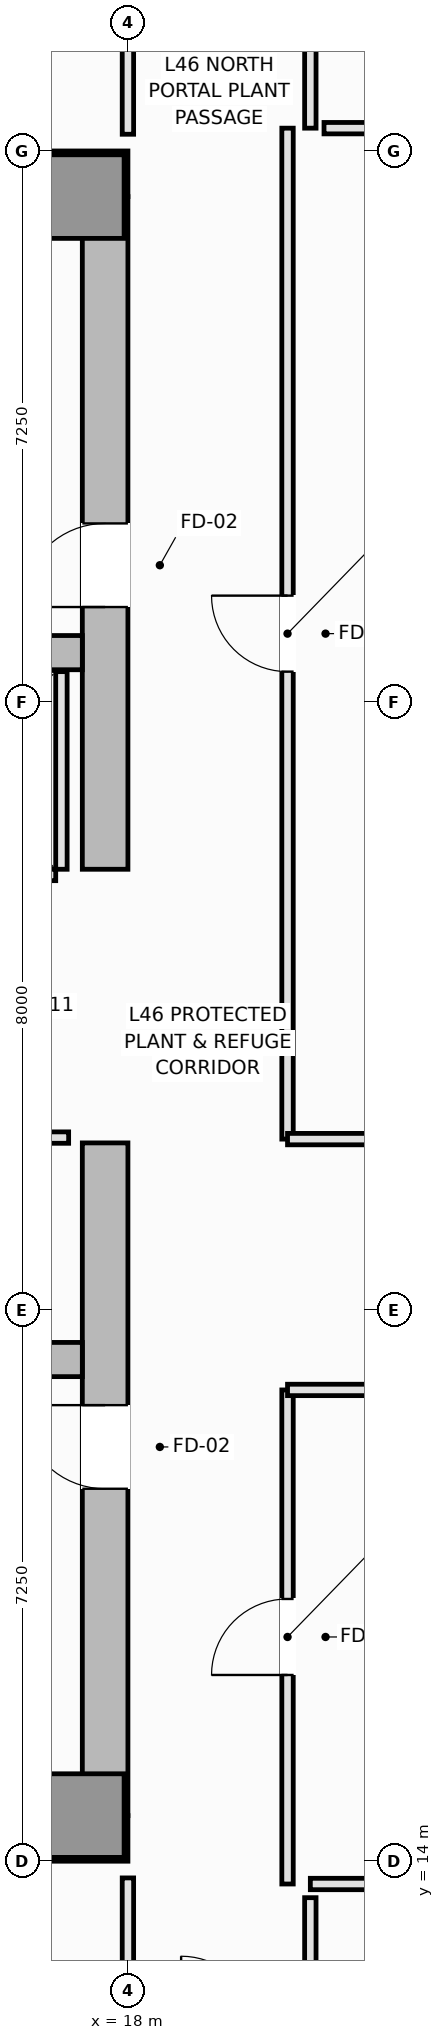
"""IFC4 building model, lengths in metres.
Left out: names, types, materials, properties, quantities, classifications, styles, units other than length and angle.
Written with IfcOpenShell. Run it as: python <this file> out.ifc"""

import sys

from ifc_helpers import new_model, si_unit, direction, frame, frame_2d, origin, origin_2d, place, context, subcontext, project, spatial, rectangle, extrude, element, fill, save


model = new_model("IFC4")
c1 = context("Model", 3, precision=1e-05, world=origin(), true_north=direction((0.0, 1.0)))
c2 = subcontext(c1, "Body", "Model", "MODEL_VIEW")
j1 = project(units=[si_unit("LENGTHUNIT", "METRE"), si_unit("PLANEANGLEUNIT", "RADIAN")], contexts=[c1])
p1 = place(None, origin())
s1 = spatial("IfcSite", under=j1, at=p1, CompositionType="ELEMENT")
p2 = place(p1, origin())
s2 = spatial("IfcBuilding", under=s1, at=p2, CompositionType="ELEMENT")
p3 = place(p2, frame((0.0, 0.0, 173.25)))
s3 = spatial("IfcBuildingStorey", under=s2, at=p3, CompositionType="ELEMENT", Elevation=173.25)
for number, where, z_axis, x_axis in (
    (1, (4.5, 14.3, 0.0), (0.0, 0.0, 1.0), (1.0, 0.0, 0.0)),
    (2, (4.5, 36.2, 0.0), (0.0, 0.0, 1.0), (1.0, 0.0, 0.0)),
):
    element("IfcWall", number, at=place(p3, frame(where, z_axis=z_axis, x_axis=x_axis)), inside=s3, PredefinedType="SHEAR", context=c2, shape_type="SweptSolid", body=[
        extrude(rectangle(XDim=13.5, YDim=0.6, at=frame_2d((6.75, 0.0))), origin(), (0.0, 0.0, 1.0), 4.8),
    ])
p4 = place(p3, frame((17.7, 14.6, 0.0), z_axis=(0.0, 0.0, 1.0), x_axis=(0.0, 1.0, 0.0)))
e3 = element("IfcWall", 3, at=p4, inside=s3, PredefinedType="SHEAR", context=c2, shape_type="SweptSolid", body=[
    extrude(rectangle(XDim=8.85, YDim=0.6, at=frame_2d((4.425, 0.0))), origin(), (0.0, 0.0, 1.0), 4.8),
])
p5 = place(p4, frame((4.3, 0.0, 0.0)))
e4 = element("IfcOpeningElement", 4, at=p5, cuts=e3, PredefinedType="OPENING", context=c2, shape_type="SweptSolid", body=[
    extrude(rectangle(XDim=1.1, YDim=2.15, at=frame_2d((0.55, 1.075))), frame((0.0, 0.31, 0.0), z_axis=(0.0, -1.0, 0.0), x_axis=(1.0, 0.0, 0.0)), (0.0, 0.0, 1.0), 0.62),
])
p6 = place(p3, frame((17.7, 27.05, 0.0), z_axis=(0.0, 0.0, 1.0), x_axis=(0.0, 1.0, 0.0)))
e5 = element("IfcWall", 5, at=p6, inside=s3, PredefinedType="SHEAR", context=c2, shape_type="SweptSolid", body=[
    extrude(rectangle(XDim=8.85, YDim=0.6, at=frame_2d((4.425, 0.0))), origin(), (0.0, 0.0, 1.0), 4.8),
])
p7 = place(p6, frame((3.45, 0.0, 0.0)))
e6 = element("IfcOpeningElement", 6, at=p7, cuts=e5, PredefinedType="OPENING", context=c2, shape_type="SweptSolid", body=[
    extrude(rectangle(XDim=1.1, YDim=2.15, at=frame_2d((0.55, 1.075))), frame((0.0, 0.31, 0.0), z_axis=(0.0, -1.0, 0.0), x_axis=(1.0, 0.0, 0.0)), (0.0, 0.0, 1.0), 0.62),
])
for number, where, z_axis, x_axis in (
    (7, (5.1, 20.6, 0.0), (0.0, 0.0, 1.0), (1.0, 0.0, 0.0)),
    (8, (5.1, 29.9, 0.0), (0.0, 0.0, 1.0), (1.0, 0.0, 0.0)),
):
    element("IfcWall", number, at=place(p3, frame(where, z_axis=z_axis, x_axis=x_axis)), inside=s3, PredefinedType="SHEAR", context=c2, shape_type="SweptSolid", body=[
        extrude(rectangle(XDim=12.3, YDim=0.45, at=frame_2d((6.15, 0.0))), origin(), (0.0, 0.0, 1.0), 4.8),
    ])
for number, where, z_axis, x_axis in (
    (9, (17.4, 14.6, 0.0), (0.0, 0.0, 1.0), (1.0, 0.0, 0.0)),
    (10, (17.4, 35.9, 0.0), (0.0, 0.0, 1.0), (1.0, 0.0, 0.0)),
):
    element("IfcColumn", number, at=place(p3, frame(where, z_axis=z_axis, x_axis=x_axis)), inside=s3, PredefinedType="PILASTER", context=c2, shape_type="SweptSolid", body=[
        extrude(rectangle(XDim=1.1, YDim=1.1, at=origin_2d()), origin(), (0.0, 0.0, 1.0), 4.8),
    ])
p8 = place(p3, frame((14.5, 26.975, 0.0), z_axis=(0.0, 0.0, 1.0), x_axis=(1.0, 0.0, 0.0)))
e11 = element("IfcWall", 11, at=p8, inside=s3, PredefinedType="PARTITIONING", context=c2, shape_type="SweptSolid", body=[
    extrude(rectangle(XDim=2.55, YDim=0.15, at=frame_2d((1.275, 0.0))), origin(), (0.0, 0.0, 1.0), 4.6),
])
p9 = place(p8, frame((0.625, 0.0, 0.0)))
e12 = element("IfcOpeningElement", 12, at=p9, cuts=e11, PredefinedType="OPENING", context=c2, shape_type="SweptSolid", body=[
    extrude(rectangle(XDim=1.3, YDim=2.2, at=frame_2d((0.65, 1.1))), frame((0.0, 0.085, 0.0), z_axis=(0.0, -1.0, 0.0), x_axis=(1.0, 0.0, 0.0)), (0.0, 0.0, 1.0), 0.17),
])
p10 = place(p3, frame((17.125, 27.05, 0.0), z_axis=(0.0, 0.0, 1.0), x_axis=(0.0, 1.0, 0.0)))
e13 = element("IfcWall", 13, at=p10, inside=s3, PredefinedType="PARTITIONING", context=c2, shape_type="SweptSolid", body=[
    extrude(rectangle(XDim=2.6, YDim=0.15, at=frame_2d((1.3, 0.0))), origin(), (0.0, 0.0, 1.0), 4.6),
])
p11 = place(p3, frame((14.33, 23.52, 0.0), z_axis=(0.0, 0.0, 1.0), x_axis=(1.0, 0.0, 0.0)))
e14 = element("IfcWall", 14, at=p11, inside=s3, PredefinedType="PARTITIONING", context=c2, shape_type="SweptSolid", body=[
    extrude(rectangle(XDim=2.89, YDim=0.15, at=frame_2d((1.445, 0.0))), origin(), (0.0, 0.0, 1.0), 4.6),
])
p12 = place(p11, frame((1.053, 0.0, 0.0)))
e15 = element("IfcOpeningElement", 15, at=p12, cuts=e14, PredefinedType="OPENING", context=c2, shape_type="SweptSolid", body=[
    extrude(rectangle(XDim=0.9, YDim=2.1, at=frame_2d((0.45, 1.05))), frame((0.0, 0.085, 0.0), z_axis=(0.0, -1.0, 0.0), x_axis=(1.0, 0.0, 0.0)), (0.0, 0.0, 1.0), 0.17),
])
p13 = place(p3, frame((20.1, 13.7, 0.0), z_axis=(0.0, 0.0, 1.0), x_axis=(0.0, 1.0, 0.0)))
e16 = element("IfcWall", 16, at=p13, inside=s3, PredefinedType="PARTITIONING", context=c2, shape_type="SweptSolid", body=[
    extrude(rectangle(XDim=6.5, YDim=0.15, at=frame_2d((3.25, 0.0))), origin(), (0.0, 0.0, 1.0), 4.6),
])
p14 = place(p13, frame((2.75, 0.0, 0.0)))
e17 = element("IfcOpeningElement", 17, at=p14, cuts=e16, PredefinedType="OPENING", context=c2, shape_type="SweptSolid", body=[
    extrude(rectangle(XDim=1.0, YDim=2.15, at=frame_2d((0.5, 1.075))), frame((0.0, 0.085, 0.0), z_axis=(0.0, -1.0, 0.0), x_axis=(1.0, 0.0, 0.0)), (0.0, 0.0, 1.0), 0.17),
])
p15 = place(p3, frame((20.1, 23.5, 0.0), z_axis=(0.0, 0.0, 1.0), x_axis=(0.0, 1.0, 0.0)))
e18 = element("IfcWall", 18, at=p15, inside=s3, PredefinedType="PARTITIONING", context=c2, shape_type="SweptSolid", body=[
    extrude(rectangle(XDim=13.3, YDim=0.15, at=frame_2d((6.65, 0.0))), origin(), (0.0, 0.0, 1.0), 4.6),
])
p16 = place(p15, frame((6.15, 0.0, 0.0)))
e19 = element("IfcOpeningElement", 19, at=p16, cuts=e18, PredefinedType="OPENING", context=c2, shape_type="SweptSolid", body=[
    extrude(rectangle(XDim=1.0, YDim=2.15, at=frame_2d((0.5, 1.075))), frame((0.0, 0.085, 0.0), z_axis=(0.0, -1.0, 0.0), x_axis=(1.0, 0.0, 0.0)), (0.0, 0.0, 1.0), 0.17),
])
p17 = place(p3, frame((20.1, 20.2, 0.0), z_axis=(0.0, 0.0, 1.0), x_axis=(1.0, 0.0, 0.0)))
e20 = element("IfcWall", 20, at=p17, inside=s3, PredefinedType="PARTITIONING", context=c2, shape_type="SweptSolid", body=[
    extrude(rectangle(XDim=14.5, YDim=0.15, at=frame_2d((7.25, 0.0))), origin(), (0.0, 0.0, 1.0), 4.6),
])
p18 = place(p3, frame((20.1, 23.5, 0.0), z_axis=(0.0, 0.0, 1.0), x_axis=(1.0, 0.0, 0.0)))
e21 = element("IfcWall", 21, at=p18, inside=s3, PredefinedType="PARTITIONING", context=c2, shape_type="SweptSolid", body=[
    extrude(rectangle(XDim=17.1, YDim=0.15, at=frame_2d((8.55, 0.0))), origin(), (0.0, 0.0, 1.0), 4.6),
])
p19 = place(p3, frame((20.4, 38.57, 0.0), z_axis=(0.0, 0.0, 1.0), x_axis=(0.0, -1.0, 0.0)))
e22 = element("IfcWall", 22, at=p19, inside=s3, PredefinedType="PARTITIONING", context=c2, shape_type="SweptSolid", body=[
    extrude(rectangle(XDim=1.77, YDim=0.15, at=frame_2d((0.885, 0.0))), origin(), (0.0, 0.0, 1.0), 4.6),
])
p20 = place(p3, frame((20.58, 36.8, 0.0), z_axis=(0.0, 0.0, 1.0), x_axis=(1.0, 0.0, 0.0)))
e23 = element("IfcWall", 23, at=p20, inside=s3, PredefinedType="PARTITIONING", context=c2, shape_type="SweptSolid", body=[
    extrude(rectangle(XDim=16.62, YDim=0.15, at=frame_2d((8.31, 0.0))), origin(), (0.0, 0.0, 1.0), 4.6),
])
p21 = place(p3, frame((34.42, 13.7, 0.0), z_axis=(0.0, 0.0, 1.0), x_axis=(-1.0, 0.0, 0.0)))
e24 = element("IfcWall", 24, at=p21, inside=s3, PredefinedType="PARTITIONING", context=c2, shape_type="SweptSolid", body=[
    extrude(rectangle(XDim=14.02, YDim=0.15, at=frame_2d((7.01, 0.0))), origin(), (0.0, 0.0, 1.0), 4.6),
])
p22 = place(p3, frame((20.4, 13.52, 0.0), z_axis=(0.0, 0.0, 1.0), x_axis=(0.0, -1.0, 0.0)))
e25 = element("IfcWall", 25, at=p22, inside=s3, PredefinedType="PARTITIONING", context=c2, shape_type="SweptSolid", body=[
    extrude(rectangle(XDim=1.59, YDim=0.15, at=frame_2d((0.795, 0.0))), origin(), (0.0, 0.0, 1.0), 4.6),
])
for number, where, z_axis, x_axis in (
    (26, (18.0, 11.93, 0.0), (0.0, 0.0, 1.0), (0.0, 1.0, 0.0)),
    (27, (18.0, 36.72, 0.0), (0.0, 0.0, 1.0), (0.0, 1.0, 0.0)),
):
    element("IfcWall", number, at=place(p3, frame(where, z_axis=z_axis, x_axis=x_axis)), inside=s3, PredefinedType="PARTITIONING", context=c2, shape_type="SweptSolid", body=[
        extrude(rectangle(XDim=1.85, YDim=0.15, at=frame_2d((0.925, 0.0))), origin(), (0.0, 0.0, 1.0), 4.6),
    ])
p23 = place(p5, origin())
e28 = element("IfcDoor", 28, at=p23, inside=s3, OperationType="SINGLE_SWING_RIGHT", PredefinedType="DOOR", context=c2, shape_type="SweptSolid", body=[
    extrude(rectangle(XDim=1.1, YDim=2.15, at=frame_2d((0.55, 1.075))), frame((0.0, 0.025, 0.0), z_axis=(0.0, -1.0, 0.0), x_axis=(1.0, 0.0, 0.0)), (0.0, 0.0, 1.0), 0.05),
])
fill(e4, e28)
p24 = place(p7, origin())
e29 = element("IfcDoor", 29, at=p24, inside=s3, OperationType="SINGLE_SWING_LEFT", PredefinedType="DOOR", context=c2, shape_type="SweptSolid", body=[
    extrude(rectangle(XDim=1.1, YDim=2.15, at=frame_2d((0.55, 1.075))), frame((0.0, 0.025, 0.0), z_axis=(0.0, -1.0, 0.0), x_axis=(1.0, 0.0, 0.0)), (0.0, 0.0, 1.0), 0.05),
])
fill(e6, e29)
p25 = place(p14, origin())
e30 = element("IfcDoor", 30, at=p25, inside=s3, OperationType="SINGLE_SWING_LEFT", PredefinedType="DOOR", context=c2, shape_type="SweptSolid", body=[
    extrude(rectangle(XDim=1.0, YDim=2.15, at=frame_2d((0.5, 1.075))), frame((0.0, 0.025, 0.0), z_axis=(0.0, -1.0, 0.0), x_axis=(1.0, 0.0, 0.0)), (0.0, 0.0, 1.0), 0.05),
])
fill(e17, e30)
p26 = place(p16, origin())
e31 = element("IfcDoor", 31, at=p26, inside=s3, OperationType="SINGLE_SWING_RIGHT", PredefinedType="DOOR", context=c2, shape_type="SweptSolid", body=[
    extrude(rectangle(XDim=1.0, YDim=2.15, at=frame_2d((0.5, 1.075))), frame((0.0, 0.025, 0.0), z_axis=(0.0, -1.0, 0.0), x_axis=(1.0, 0.0, 0.0)), (0.0, 0.0, 1.0), 0.05),
])
fill(e19, e31)
save(model, sys.argv[1])
